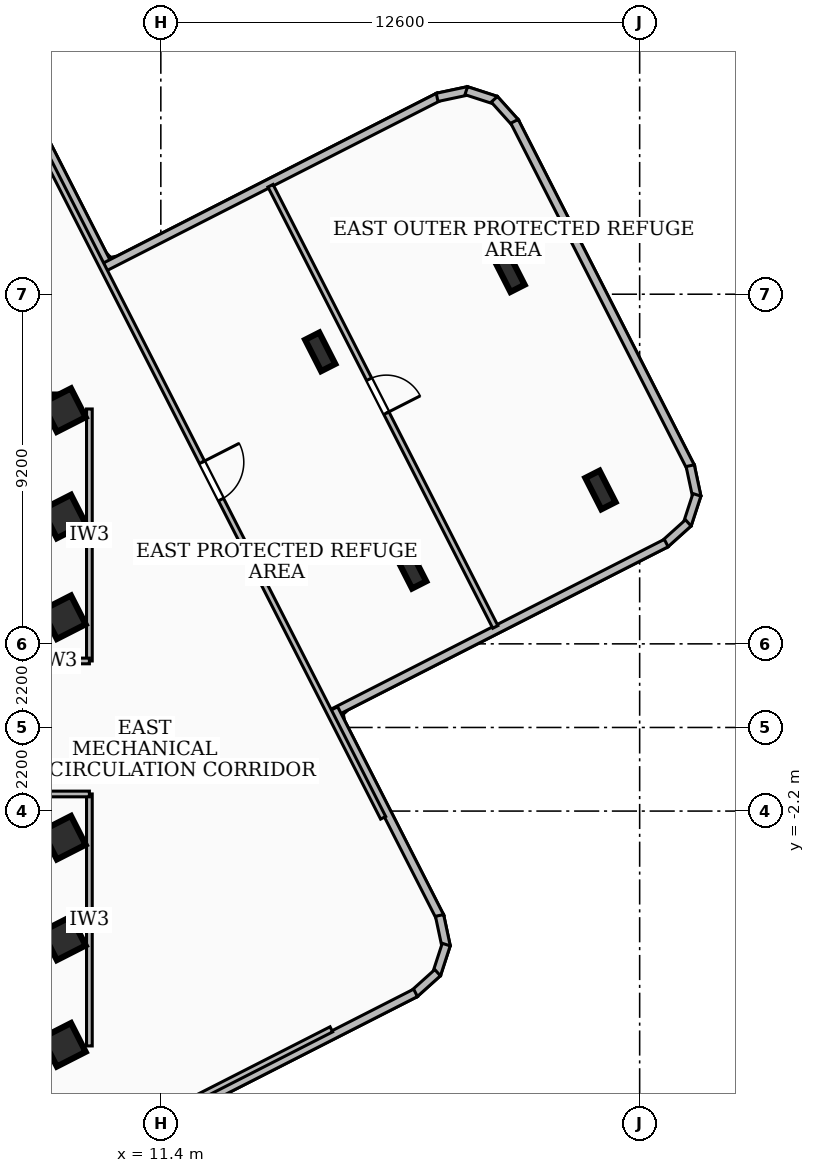
"""IFC4 building model, lengths in metres.
Left out: names, types, materials, properties, quantities, classifications, styles, units other than length and angle.
Written with IfcOpenShell. Run it as: python <this file> out.ifc"""

import sys

from ifc_helpers import new_model, si_unit, direction, frame, frame_2d, origin, origin_2d, place, context, subcontext, project, spatial, rectangle, i_section, extrude, element, fill, save


model = new_model("IFC4")
c1 = context("Model", 3, precision=1e-05, world=origin(), true_north=direction((0.0, 1.0)))
c2 = subcontext(c1, "Body", "Model", "MODEL_VIEW")
j1 = project(units=[si_unit("LENGTHUNIT", "METRE"), si_unit("PLANEANGLEUNIT", "RADIAN")], contexts=[c1])
p1 = place(None, origin())
s1 = spatial("IfcSite", under=j1, at=p1, CompositionType="ELEMENT")
p2 = place(p1, origin())
s2 = spatial("IfcBuilding", under=s1, at=p2, CompositionType="ELEMENT")
p3 = place(p2, frame((0.0, 0.0, 196.2)))
s3 = spatial("IfcBuildingStorey", under=s2, at=p3, CompositionType="ELEMENT", Elevation=196.2)
for number, where, z_axis, x_axis in (
    (1, (-8.78, 8.535, 0.0), (0.0, 0.0, 1.0), (1.0, 0.0, 0.0)),
    (2, (8.78, -8.535, 0.0), (0.0, 0.0, 1.0), (-1.0, 0.0, 0.0)),
):
    element("IfcWall", number, at=place(p3, frame(where, z_axis=z_axis, x_axis=x_axis)), inside=s3, PredefinedType="SHEAR", context=c2, shape_type="SweptSolid", body=[
        extrude(rectangle(XDim=17.56, YDim=0.45, at=frame_2d((8.78, 0.0))), origin(), (0.0, 0.0, 1.0), 4.42),
    ])
for number, where, z_axis, x_axis in (
    (3, (8.85, -5.55, 0.0), (0.0, 0.0, 1.0), (0.891, 0.454, 0.0)),
    (4, (8.85, -2.9, 0.0), (0.0, 0.0, 1.0), (0.891, 0.454, 0.0)),
    (5, (8.85, 2.9, 0.0), (0.0, 0.0, 1.0), (0.891, 0.454, 0.0)),
    (6, (8.85, 5.55, 0.0), (0.0, 0.0, 1.0), (0.891, 0.454, 0.0)),
    (7, (8.85, -8.35, 0.0), (0.0, 0.0, 1.0), (0.891, 0.454, 0.0)),
    (8, (8.85, 8.35, 0.0), (0.0, 0.0, 1.0), (0.891, 0.454, 0.0)),
):
    element("IfcColumn", number, at=place(p3, frame(where, z_axis=z_axis, x_axis=x_axis)), inside=s3, PredefinedType="COLUMN", context=c2, shape_type="SweptSolid", body=[
        extrude(rectangle(XDim=0.85, YDim=0.85, at=origin_2d()), origin(), (0.0, 0.0, 1.0), 4.68),
    ])
for number, where, z_axis, x_axis in (
    (9, (17.987, 4.164, 0.0), (0.0, 0.0, 1.0), (0.891, 0.454, 0.0)),
    (10, (15.594, 9.883, 0.0), (0.0, 0.0, 1.0), (0.891, 0.454, 0.0)),
    (11, (22.968, 6.248, 0.0), (0.0, 0.0, 1.0), (0.891, 0.454, 0.0)),
    (12, (20.576, 11.967, 0.0), (0.0, 0.0, 1.0), (0.891, 0.454, 0.0)),
):
    element("IfcColumn", number, at=place(p3, frame(where, z_axis=z_axis, x_axis=x_axis)), inside=s3, PredefinedType="COLUMN", context=c2, shape_type="SweptSolid", body=[
        extrude(i_section(OverallWidth=0.418, OverallDepth=0.927, WebThickness=0.019, FlangeThickness=0.032, at=origin_2d()), origin(), (0.0, 0.0, 1.0), 4.68),
    ])
p4 = place(p3, frame((6.983, 18.103, 0.0), z_axis=(0.0, 0.0, 1.0), x_axis=(0.454021572326, -0.890990691232, 0.0)))
e13 = element("IfcWall", 13, at=p4, inside=s3, PredefinedType="SOLIDWALL", context=c2, shape_type="SweptSolid", body=[
    extrude(rectangle(XDim=6.758, YDim=0.22, at=frame_2d((3.379, 0.0))), origin(), (0.0, 0.0, 1.0), 2.212),
])
p5 = place(p3, frame((9.933, 12.12, 0.0), z_axis=(0.0, 0.0, 1.0), x_axis=(0.89101832643, 0.453967335792, 0.0)))
e14 = element("IfcWall", 14, at=p5, inside=s3, PredefinedType="SOLIDWALL", context=c2, shape_type="SweptSolid", body=[
    extrude(rectangle(XDim=9.857, YDim=0.22, at=frame_2d((4.929, 0.0))), origin(), (0.0, 0.0, 1.0), 2.212),
])
p6 = place(p3, frame((18.67, 16.579, 0.0), z_axis=(0.0, 0.0, 1.0), x_axis=(0.978250341406, 0.207427745347, 0.0)))
e15 = element("IfcWall", 15, at=p6, inside=s3, PredefinedType="SOLIDWALL", context=c2, shape_type="SweptSolid", body=[
    extrude(rectangle(XDim=0.833, YDim=0.22, at=frame_2d((0.417, 0.0))), origin(), (0.0, 0.0, 1.0), 4.42),
])
p7 = place(p3, frame((19.437, 16.755, 0.0), z_axis=(0.0, 0.0, 1.0), x_axis=(0.951241708051, -0.308446450561, 0.0)))
e16 = element("IfcWall", 16, at=p7, inside=s3, PredefinedType="SOLIDWALL", context=c2, shape_type="SweptSolid", body=[
    extrude(rectangle(XDim=0.82, YDim=0.22, at=frame_2d((0.41, 0.0))), origin(), (0.0, 0.0, 1.0), 4.42),
])
p8 = place(p3, frame((20.176, 16.529, 0.0), z_axis=(0.0, 0.0, 1.0), x_axis=(0.668221184222, -0.743962666373, 0.0)))
e17 = element("IfcWall", 17, at=p8, inside=s3, PredefinedType="SOLIDWALL", context=c2, shape_type="SweptSolid", body=[
    extrude(rectangle(XDim=0.835, YDim=0.22, at=frame_2d((0.417, 0.0))), origin(), (0.0, 0.0, 1.0), 4.42),
])
p9 = place(p3, frame((20.706, 15.949, 0.0), z_axis=(0.0, 0.0, 1.0), x_axis=(0.453965499757, -0.891019261874, 0.0)))
e18 = element("IfcWall", 18, at=p9, inside=s3, PredefinedType="SOLIDWALL", context=c2, shape_type="SweptSolid", body=[
    extrude(rectangle(XDim=10.221, YDim=0.22, at=frame_2d((5.11, 0.0))), origin(), (0.0, 0.0, 1.0), 4.42),
])
p10 = place(p3, frame((25.33, 6.888, 0.0), z_axis=(0.0, 0.0, 1.0), x_axis=(0.207487211814, -0.978237730275, 0.0)))
e19 = element("IfcWall", 19, at=p10, inside=s3, PredefinedType="SOLIDWALL", context=c2, shape_type="SweptSolid", body=[
    extrude(rectangle(XDim=0.833, YDim=0.22, at=frame_2d((0.417, 0.0))), origin(), (0.0, 0.0, 1.0), 4.42),
])
p11 = place(p3, frame((25.506, 6.121, 0.0), z_axis=(0.0, 0.0, 1.0), x_axis=(-0.310143535684, -0.950689742909, 0.0)))
e20 = element("IfcWall", 20, at=p11, inside=s3, PredefinedType="SOLIDWALL", context=c2, shape_type="SweptSolid", body=[
    extrude(rectangle(XDim=0.82, YDim=0.22, at=frame_2d((0.41, 0.0))), origin(), (0.0, 0.0, 1.0), 4.42),
])
p12 = place(p3, frame((25.279, 5.383, 0.0), z_axis=(0.0, 0.0, 1.0), x_axis=(-0.743236035758, -0.669029293194, 0.0)))
e21 = element("IfcWall", 21, at=p12, inside=s3, PredefinedType="SOLIDWALL", context=c2, shape_type="SweptSolid", body=[
    extrude(rectangle(XDim=0.836, YDim=0.22, at=frame_2d((0.418, 0.0))), origin(), (0.0, 0.0, 1.0), 4.42),
])
p13 = place(p3, frame((24.699, 4.852, 0.0), z_axis=(0.0, 0.0, 1.0), x_axis=(-0.891008307955, -0.453986998883, 0.0)))
e22 = element("IfcWall", 22, at=p13, inside=s3, PredefinedType="SOLIDWALL", context=c2, shape_type="SweptSolid", body=[
    extrude(rectangle(XDim=9.857, YDim=0.22, at=frame_2d((4.929, 0.0))), origin(), (0.0, 0.0, 1.0), 2.212),
])
p14 = place(p3, frame((15.954, 0.495, 0.0), z_axis=(0.0, 0.0, 1.0), x_axis=(0.454003577481, -0.890999860625, 0.0)))
e23 = element("IfcWall", 23, at=p14, inside=s3, PredefinedType="SOLIDWALL", context=c2, shape_type="SweptSolid", body=[
    extrude(rectangle(XDim=6.158, YDim=0.22, at=frame_2d((3.079, 0.0))), origin(), (0.0, 0.0, 1.0), 2.212),
])
p15 = place(p3, frame((18.734, -4.946, 0.0), z_axis=(0.0, 0.0, 1.0), x_axis=(0.207767630705, -0.978178210569, 0.0)))
e24 = element("IfcWall", 24, at=p15, inside=s3, PredefinedType="SOLIDWALL", context=c2, shape_type="SweptSolid", body=[
    extrude(rectangle(XDim=0.833, YDim=0.22, at=frame_2d((0.417, 0.0))), origin(), (0.0, 0.0, 1.0), 4.42),
])
p16 = place(p3, frame((18.91, -5.713, 0.0), z_axis=(0.0, 0.0, 1.0), x_axis=(-0.309523466815, -0.950891804303, 0.0)))
e25 = element("IfcWall", 25, at=p16, inside=s3, PredefinedType="SOLIDWALL", context=c2, shape_type="SweptSolid", body=[
    extrude(rectangle(XDim=0.82, YDim=0.22, at=frame_2d((0.41, 0.0))), origin(), (0.0, 0.0, 1.0), 4.42),
])
p17 = place(p3, frame((18.683, -6.452, 0.0), z_axis=(0.0, 0.0, 1.0), x_axis=(-0.743236035758, -0.669029293194, 0.0)))
e26 = element("IfcWall", 26, at=p17, inside=s3, PredefinedType="SOLIDWALL", context=c2, shape_type="SweptSolid", body=[
    extrude(rectangle(XDim=0.836, YDim=0.22, at=frame_2d((0.418, 0.0))), origin(), (0.0, 0.0, 1.0), 4.42),
])
p18 = place(p3, frame((18.103, -6.983, 0.0), z_axis=(0.0, 0.0, 1.0), x_axis=(-0.890990691232, -0.454021572326, 0.0)))
e27 = element("IfcWall", 27, at=p18, inside=s3, PredefinedType="SOLIDWALL", context=c2, shape_type="SweptSolid", body=[
    extrude(rectangle(XDim=6.758, YDim=0.22, at=frame_2d((3.379, 0.0))), origin(), (0.0, 0.0, 1.0), 2.212),
])
p19 = place(p3, frame((9.52, 1.75, 0.0), z_axis=(0.0, 0.0, 1.0), x_axis=(0.0, 1.0, 0.0)))
e28 = element("IfcWall", 28, at=p19, inside=s3, PredefinedType="PARTITIONING", context=c2, shape_type="SweptSolid", body=[
    extrude(rectangle(XDim=6.63, YDim=0.15, at=frame_2d((3.315, 0.0))), origin(), (0.0, 0.0, 1.0), 2.212),
])
p20 = place(p3, frame((7.85, 1.75, 0.0), z_axis=(0.0, 0.0, 1.0), x_axis=(1.0, 0.0, 0.0)))
e29 = element("IfcWall", 29, at=p20, inside=s3, PredefinedType="PARTITIONING", context=c2, shape_type="SweptSolid", body=[
    extrude(rectangle(XDim=1.67, YDim=0.15, at=frame_2d((0.835, 0.0))), origin(), (0.0, 0.0, 1.0), 3.65),
])
p21 = place(p3, frame((9.52, -8.38, 0.0), z_axis=(0.0, 0.0, 1.0), x_axis=(0.0, 1.0, 0.0)))
e30 = element("IfcWall", 30, at=p21, inside=s3, PredefinedType="PARTITIONING", context=c2, shape_type="SweptSolid", body=[
    extrude(rectangle(XDim=6.63, YDim=0.15, at=frame_2d((3.315, 0.0))), origin(), (0.0, 0.0, 1.0), 4.42),
])
p22 = place(p3, frame((7.85, -1.75, 0.0), z_axis=(0.0, 0.0, 1.0), x_axis=(1.0, 0.0, 0.0)))
e31 = element("IfcWall", 31, at=p22, inside=s3, PredefinedType="PARTITIONING", context=c2, shape_type="SweptSolid", body=[
    extrude(rectangle(XDim=1.67, YDim=0.15, at=frame_2d((0.835, 0.0))), origin(), (0.0, 0.0, 1.0), 3.65),
])
p23 = place(p3, frame((7.943, 15.887, 0.0), z_axis=(0.0, 0.0, 1.0), x_axis=(0.454027476073, -0.890987682839, 0.0)))
e32 = element("IfcWall", 32, at=p23, inside=s3, PredefinedType="PARTITIONING", context=c2, shape_type="SweptSolid", body=[
    extrude(rectangle(XDim=20.499, YDim=0.15, at=frame_2d((10.249, 0.0))), origin(), (0.0, 0.0, 1.0), 2.212),
])
p24 = place(p23, frame((10.0, 0.0, 0.0)))
e33 = element("IfcOpeningElement", 33, at=p24, cuts=e32, PredefinedType="OPENING", context=c2, shape_type="SweptSolid", body=[
    extrude(rectangle(XDim=1.1, YDim=2.15, at=frame_2d((0.55, 1.075))), frame((0.0, 0.085, 0.0), z_axis=(0.0, -1.0, 0.0), x_axis=(1.0, 0.0, 0.0)), (0.0, 0.0, 1.0), 0.17),
])
p25 = place(p3, frame((14.286, 14.254, 0.0), z_axis=(0.0, 0.0, 1.0), x_axis=(0.454050966536, -0.890975712232, 0.0)))
e34 = element("IfcWall", 34, at=p25, inside=s3, PredefinedType="PARTITIONING", context=c2, shape_type="SweptSolid", body=[
    extrude(rectangle(XDim=13.029, YDim=0.15, at=frame_2d((6.515, 0.0))), origin(), (0.0, 0.0, 1.0), 2.212),
])
p26 = place(p25, frame((5.715, 0.0, 0.0)))
e35 = element("IfcOpeningElement", 35, at=p26, cuts=e34, PredefinedType="OPENING", context=c2, shape_type="SweptSolid", body=[
    extrude(rectangle(XDim=1.0, YDim=2.1, at=frame_2d((0.5, 1.05))), frame((0.0, 0.085, 0.0), z_axis=(0.0, -1.0, 0.0), x_axis=(1.0, 0.0, 0.0)), (0.0, 0.0, 1.0), 0.17),
])
p27 = place(p3, frame((15.887, -7.943, 0.0), z_axis=(0.0, 0.0, 1.0), x_axis=(-0.890987682839, -0.454027476073, 0.0)))
e36 = element("IfcWall", 36, at=p27, inside=s3, PredefinedType="PARTITIONING", context=c2, shape_type="SweptSolid", body=[
    extrude(rectangle(XDim=20.499, YDim=0.15, at=frame_2d((10.249, 0.0))), origin(), (0.0, 0.0, 1.0), 2.212),
])
p28 = place(p27, frame((10.0, 0.0, 0.0)))
e37 = element("IfcOpeningElement", 37, at=p28, cuts=e36, PredefinedType="OPENING", context=c2, shape_type="SweptSolid", body=[
    extrude(rectangle(XDim=1.1, YDim=2.15, at=frame_2d((0.55, 1.075))), frame((0.0, 0.085, 0.0), z_axis=(0.0, -1.0, 0.0), x_axis=(1.0, 0.0, 0.0)), (0.0, 0.0, 1.0), 0.17),
])
p29 = place(p24, origin())
e38 = element("IfcDoor", 38, at=p29, inside=s3, OperationType="SINGLE_SWING_LEFT", PredefinedType="DOOR", context=c2, shape_type="SweptSolid", body=[
    extrude(rectangle(XDim=1.1, YDim=2.15, at=frame_2d((0.55, 1.075))), frame((0.0, 0.025, 0.0), z_axis=(0.0, -1.0, 0.0), x_axis=(1.0, 0.0, 0.0)), (0.0, 0.0, 1.0), 0.05),
])
fill(e33, e38)
p30 = place(p26, origin())
e39 = element("IfcDoor", 39, at=p30, inside=s3, OperationType="SINGLE_SWING_RIGHT", PredefinedType="DOOR", context=c2, shape_type="SweptSolid", body=[
    extrude(rectangle(XDim=1.0, YDim=2.1, at=frame_2d((0.5, 1.05))), frame((0.0, 0.025, 0.0), z_axis=(0.0, -1.0, 0.0), x_axis=(1.0, 0.0, 0.0)), (0.0, 0.0, 1.0), 0.05),
])
fill(e35, e39)
save(model, sys.argv[1])
